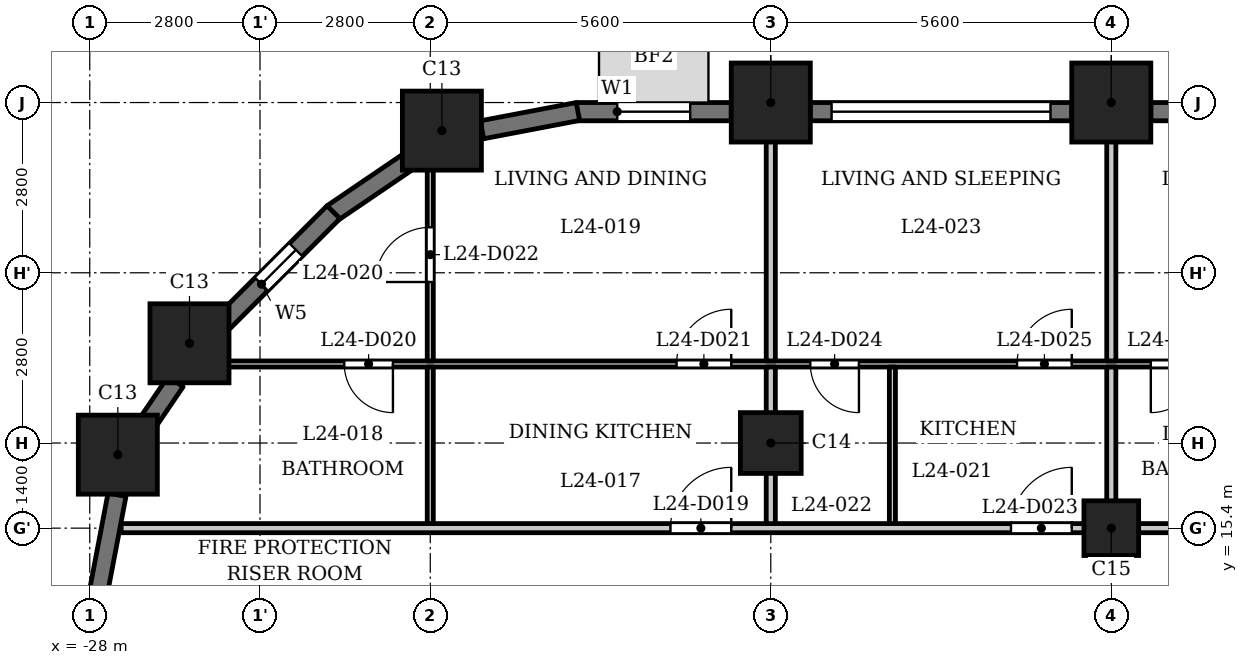
"""IFC4 building model, lengths in metres.
Left out: names, types, materials, properties, quantities, classifications, styles, units other than length and angle.
Written with IfcOpenShell. Run it as: python <this file> out.ifc"""

import sys

from ifc_helpers import new_model, si_unit, direction, frame, frame_2d, origin, origin_2d, place, context, subcontext, project, spatial, rectangle, extrude, element, fill, save


model = new_model("IFC4")
c1 = context("Model", 3, precision=1e-05, world=origin(), true_north=direction((0.0, 1.0)))
c2 = subcontext(c1, "Body", "Model", "MODEL_VIEW")
j1 = project(units=[si_unit("LENGTHUNIT", "METRE"), si_unit("PLANEANGLEUNIT", "RADIAN")], contexts=[c1])
p1 = place(None, origin())
s1 = spatial("IfcSite", under=j1, at=p1, CompositionType="ELEMENT")
p2 = place(p1, origin())
s2 = spatial("IfcBuilding", under=s1, at=p2, CompositionType="ELEMENT")
p3 = place(p2, frame((0.0, 0.0, 97.3)))
s3 = spatial("IfcBuildingStorey", under=s2, at=p3, CompositionType="ELEMENT", Elevation=97.3)
for number, where, z_axis, x_axis in (
    (1, (-11.2, 22.4, 0.0), (0.0, 0.0, 1.0), (1.0, 0.0, 0.0)),
    (2, (-16.8, 22.4, 0.0), (0.0, 0.0, 1.0), (1.0, 0.0, 0.0)),
    (3, (-22.209, 21.938, 0.0), (0.0, 0.0, 1.0), (1.0, 0.0, 0.0)),
    (4, (-26.36, 18.44, 0.0), (0.0, 0.0, 1.0), (1.0, 0.0, 0.0)),
    (5, (-27.538, 16.609, 0.0), (0.0, 0.0, 1.0), (1.0, 0.0, 0.0)),
):
    element("IfcColumn", number, at=place(p3, frame(where, z_axis=z_axis, x_axis=x_axis)), inside=s3, PredefinedType="COLUMN", context=c2, shape_type="SweptSolid", body=[
        extrude(rectangle(XDim=1.3, YDim=1.3, at=origin_2d()), origin(), (0.0, 0.0, 1.0), 3.5),
    ])
p4 = place(p3, frame((-16.8, 16.8, 0.0), z_axis=(0.0, 0.0, 1.0), x_axis=(1.0, 0.0, 0.0)))
e6 = element("IfcColumn", 6, at=p4, inside=s3, PredefinedType="COLUMN", context=c2, shape_type="SweptSolid", body=[
    extrude(rectangle(XDim=1.0, YDim=1.0, at=origin_2d()), origin(), (0.0, 0.0, 1.0), 3.5),
])
p5 = place(p3, frame((-11.2, 15.4, 0.0), z_axis=(0.0, 0.0, 1.0), x_axis=(1.0, 0.0, 0.0)))
e7 = element("IfcColumn", 7, at=p5, inside=s3, PredefinedType="COLUMN", context=c2, shape_type="SweptSolid", body=[
    extrude(rectangle(XDim=0.9, YDim=0.9, at=origin_2d()), origin(), (0.0, 0.0, 1.0), 3.5),
])
p6 = place(p3, frame((-6.25, 22.25, 0.0), z_axis=(0.0, 0.0, 1.0), x_axis=(-1.0, 0.0, 0.0)))
e8 = element("IfcWall", 8, at=p6, inside=s3, PredefinedType="SOLIDWALL", context=c2, shape_type="SweptSolid", body=[
    extrude(rectangle(XDim=4.3, YDim=0.3, at=frame_2d((2.15, 0.0))), origin(), (0.0, 0.0, 1.0), 2.4),
])
p7 = place(p6, frame((0.35, 0.0, 1.2)))
e9 = element("IfcOpeningElement", 9, at=p7, cuts=e8, PredefinedType="OPENING", context=c2, shape_type="SweptSolid", body=[
    extrude(rectangle(XDim=3.6, YDim=0.95, at=frame_2d((1.8, 0.475))), frame((0.0, 0.16, 0.0), z_axis=(0.0, -1.0, 0.0), x_axis=(1.0, 0.0, 0.0)), (0.0, 0.0, 1.0), 0.32),
])
p8 = place(p3, frame((-11.85, 22.25, 0.0), z_axis=(0.0, 0.0, 1.0), x_axis=(-1.0, 0.0, 0.0)))
e10 = element("IfcWall", 10, at=p8, inside=s3, PredefinedType="SOLIDWALL", context=c2, shape_type="SweptSolid", body=[
    extrude(rectangle(XDim=4.3, YDim=0.3, at=frame_2d((2.15, 0.0))), origin(), (0.0, 0.0, 1.0), 2.4),
])
p9 = place(p8, frame((0.35, 0.0, 1.2)))
e11 = element("IfcOpeningElement", 11, at=p9, cuts=e10, PredefinedType="OPENING", context=c2, shape_type="SweptSolid", body=[
    extrude(rectangle(XDim=3.6, YDim=0.95, at=frame_2d((1.8, 0.475))), frame((0.0, 0.16, 0.0), z_axis=(0.0, -1.0, 0.0), x_axis=(1.0, 0.0, 0.0)), (0.0, 0.0, 1.0), 0.32),
])
p10 = place(p3, frame((-17.45, 22.25, 0.0), z_axis=(0.0, 0.0, 1.0), x_axis=(-1.0, 0.0, 0.0)))
e12 = element("IfcWall", 12, at=p10, inside=s3, PredefinedType="SOLIDWALL", context=c2, shape_type="SweptSolid", body=[
    extrude(rectangle(XDim=2.55, YDim=0.3, at=frame_2d((1.275, 0.0))), origin(), (0.0, 0.0, 1.0), 2.4),
])
p11 = place(p10, frame((0.675, 0.0, 0.6)))
e13 = element("IfcOpeningElement", 13, at=p11, cuts=e12, PredefinedType="OPENING", context=c2, shape_type="SweptSolid", body=[
    extrude(rectangle(XDim=1.2, YDim=1.55, at=frame_2d((0.6, 0.775))), frame((0.0, 0.16, 0.0), z_axis=(0.0, -1.0, 0.0), x_axis=(1.0, 0.0, 0.0)), (0.0, 0.0, 1.0), 0.32),
])
for number, where, z_axis, x_axis in (
    (14, (-19.972, 22.253, 0.0), (0.0, 0.0, 1.0), (-0.982, -0.187, 0.0)),
    (15, (-22.684, 21.482, 0.0), (0.0, 0.0, 1.0), (-0.827, -0.562, 0.0)),
):
    element("IfcWall", number, at=place(p3, frame(where, z_axis=z_axis, x_axis=x_axis)), inside=s3, PredefinedType="SOLIDWALL", context=c2, shape_type="SweptSolid", body=[
        extrude(rectangle(XDim=1.606, YDim=0.3, at=frame_2d((0.803, 0.0))), origin(), (0.0, 0.0, 1.0), 2.4),
    ])
p12 = place(p3, frame((-23.991, 20.597, 0.0), z_axis=(0.0, 0.0, 1.0), x_axis=(-0.707106781187, -0.707106781187, 0.0)))
e16 = element("IfcWall", 16, at=p12, inside=s3, PredefinedType="SOLIDWALL", context=c2, shape_type="SweptSolid", body=[
    extrude(rectangle(XDim=2.55, YDim=0.3, at=frame_2d((1.275, 0.0))), origin(), (0.0, 0.0, 1.0), 2.4),
])
p13 = place(p12, frame((0.875, 0.0, 0.6)))
e17 = element("IfcOpeningElement", 17, at=p13, cuts=e16, PredefinedType="OPENING", context=c2, shape_type="SweptSolid", body=[
    extrude(rectangle(XDim=0.8, YDim=1.55, at=frame_2d((0.4, 0.775))), frame((0.0, 0.16, 0.0), z_axis=(0.0, -1.0, 0.0), x_axis=(1.0, 0.0, 0.0)), (0.0, 0.0, 1.0), 0.32),
])
p14 = place(p3, frame((-26.589, 17.81, 0.0), z_axis=(0.0, 0.0, 1.0), x_axis=(-0.562066330934, -0.827092159091, 0.0)))
e18 = element("IfcWall", 18, at=p14, inside=s3, PredefinedType="SOLIDWALL", context=c2, shape_type="SweptSolid", body=[
    extrude(rectangle(XDim=0.877, YDim=0.3, at=frame_2d((0.438, 0.0))), origin(), (0.0, 0.0, 1.0), 3.2),
])
p15 = place(p3, frame((-27.552, 15.949, 0.0), z_axis=(0.0, 0.0, 1.0), x_axis=(-0.187279751651, -0.982306619453, 0.0)))
e19 = element("IfcWall", 19, at=p15, inside=s3, PredefinedType="SOLIDWALL", context=c2, shape_type="SweptSolid", body=[
    extrude(rectangle(XDim=1.606, YDim=0.3, at=frame_2d((0.803, 0.0))), origin(), (0.0, 0.0, 1.0), 2.4),
])
p16 = place(p3, frame((-27.484, 15.4, 0.0), z_axis=(0.0, 0.0, 1.0), x_axis=(1.0, 0.0, 0.0)))
e20 = element("IfcWall", 20, at=p16, inside=s3, PredefinedType="PARTITIONING", context=c2, shape_type="SweptSolid", body=[
    extrude(rectangle(XDim=54.968, YDim=0.15, at=frame_2d((27.484, 0.0))), origin(), (0.0, 0.0, 1.0), 3.2),
])
p17 = place(p16, frame((9.034, 0.0, 0.0)))
e21 = element("IfcOpeningElement", 21, at=p17, cuts=e20, PredefinedType="OPENING", context=c2, shape_type="SweptSolid", body=[
    extrude(rectangle(XDim=1.0, YDim=2.1, at=frame_2d((0.5, 1.05))), frame((0.0, 0.085, 0.0), z_axis=(0.0, -1.0, 0.0), x_axis=(1.0, 0.0, 0.0)), (0.0, 0.0, 1.0), 0.17),
])
p18 = place(p16, frame((14.634, 0.0, 0.0)))
e22 = element("IfcOpeningElement", 22, at=p18, cuts=e20, PredefinedType="OPENING", context=c2, shape_type="SweptSolid", body=[
    extrude(rectangle(XDim=1.0, YDim=2.1, at=frame_2d((0.5, 1.05))), frame((0.0, 0.085, 0.0), z_axis=(0.0, -1.0, 0.0), x_axis=(1.0, 0.0, 0.0)), (0.0, 0.0, 1.0), 0.17),
])
p19 = place(p16, frame((19.984, 0.0, 0.0)))
e23 = element("IfcOpeningElement", 23, at=p19, cuts=e20, PredefinedType="OPENING", context=c2, shape_type="SweptSolid", body=[
    extrude(rectangle(XDim=1.0, YDim=2.1, at=frame_2d((0.5, 1.05))), frame((0.0, 0.085, 0.0), z_axis=(0.0, -1.0, 0.0), x_axis=(1.0, 0.0, 0.0)), (0.0, 0.0, 1.0), 0.17),
])
p20 = place(p16, frame((23.234, 0.0, 0.0)))
e24 = element("IfcOpeningElement", 24, at=p20, cuts=e20, PredefinedType="OPENING", context=c2, shape_type="SweptSolid", body=[
    extrude(rectangle(XDim=1.0, YDim=2.1, at=frame_2d((0.5, 1.05))), frame((0.0, 0.085, 0.0), z_axis=(0.0, -1.0, 0.0), x_axis=(1.0, 0.0, 0.0)), (0.0, 0.0, 1.0), 0.17),
])
p21 = place(p16, frame((28.184, 0.0, 0.0)))
e25 = element("IfcOpeningElement", 25, at=p21, cuts=e20, PredefinedType="OPENING", context=c2, shape_type="SweptSolid", body=[
    extrude(rectangle(XDim=1.0, YDim=2.1, at=frame_2d((0.5, 1.05))), frame((0.0, 0.085, 0.0), z_axis=(0.0, -1.0, 0.0), x_axis=(1.0, 0.0, 0.0)), (0.0, 0.0, 1.0), 0.17),
])
p22 = place(p16, frame((39.284, 0.0, 0.0)))
e26 = element("IfcOpeningElement", 26, at=p22, cuts=e20, PredefinedType="OPENING", context=c2, shape_type="SweptSolid", body=[
    extrude(rectangle(XDim=1.0, YDim=2.1, at=frame_2d((0.5, 1.05))), frame((0.0, 0.085, 0.0), z_axis=(0.0, -1.0, 0.0), x_axis=(1.0, 0.0, 0.0)), (0.0, 0.0, 1.0), 0.17),
])
p23 = place(p16, frame((48.234, 0.0, 0.0)))
e27 = element("IfcOpeningElement", 27, at=p23, cuts=e20, PredefinedType="OPENING", context=c2, shape_type="SweptSolid", body=[
    extrude(rectangle(XDim=1.0, YDim=2.1, at=frame_2d((0.5, 1.05))), frame((0.0, 0.085, 0.0), z_axis=(0.0, -1.0, 0.0), x_axis=(1.0, 0.0, 0.0)), (0.0, 0.0, 1.0), 0.17),
])
p24 = place(p3, frame((-26.44, 18.1, 0.0), z_axis=(0.0, 0.0, 1.0), x_axis=(1.0, 0.0, 0.0)))
e28 = element("IfcWall", 28, at=p24, inside=s3, PredefinedType="PARTITIONING", context=c2, shape_type="SweptSolid", body=[
    extrude(rectangle(XDim=52.63, YDim=0.1, at=frame_2d((26.315, 0.0))), origin(), (0.0, 0.0, 1.0), 3.2),
])
p25 = place(p24, frame((2.626, 0.0, 0.0)))
e29 = element("IfcOpeningElement", 29, at=p25, cuts=e28, PredefinedType="OPENING", context=c2, shape_type="SweptSolid", body=[
    extrude(rectangle(XDim=0.8, YDim=2.1, at=frame_2d((0.4, 1.05))), frame((0.0, 0.06, 0.0), z_axis=(0.0, -1.0, 0.0), x_axis=(1.0, 0.0, 0.0)), (0.0, 0.0, 1.0), 0.12),
])
p26 = place(p24, frame((8.09, 0.0, 0.0)))
e30 = element("IfcOpeningElement", 30, at=p26, cuts=e28, PredefinedType="OPENING", context=c2, shape_type="SweptSolid", body=[
    extrude(rectangle(XDim=0.9, YDim=2.1, at=frame_2d((0.45, 1.05))), frame((0.0, 0.06, 0.0), z_axis=(0.0, -1.0, 0.0), x_axis=(1.0, 0.0, 0.0)), (0.0, 0.0, 1.0), 0.12),
])
p27 = place(p24, frame((10.29, 0.0, 0.0)))
e31 = element("IfcOpeningElement", 31, at=p27, cuts=e28, PredefinedType="OPENING", context=c2, shape_type="SweptSolid", body=[
    extrude(rectangle(XDim=0.8, YDim=2.1, at=frame_2d((0.4, 1.05))), frame((0.0, 0.06, 0.0), z_axis=(0.0, -1.0, 0.0), x_axis=(1.0, 0.0, 0.0)), (0.0, 0.0, 1.0), 0.12),
])
p28 = place(p24, frame((13.69, 0.0, 0.0)))
e32 = element("IfcOpeningElement", 32, at=p28, cuts=e28, PredefinedType="OPENING", context=c2, shape_type="SweptSolid", body=[
    extrude(rectangle(XDim=0.9, YDim=2.1, at=frame_2d((0.45, 1.05))), frame((0.0, 0.06, 0.0), z_axis=(0.0, -1.0, 0.0), x_axis=(1.0, 0.0, 0.0)), (0.0, 0.0, 1.0), 0.12),
])
p29 = place(p24, frame((15.89, 0.0, 0.0)))
e33 = element("IfcOpeningElement", 33, at=p29, cuts=e28, PredefinedType="OPENING", context=c2, shape_type="SweptSolid", body=[
    extrude(rectangle(XDim=0.8, YDim=2.1, at=frame_2d((0.4, 1.05))), frame((0.0, 0.06, 0.0), z_axis=(0.0, -1.0, 0.0), x_axis=(1.0, 0.0, 0.0)), (0.0, 0.0, 1.0), 0.12),
])
p30 = place(p24, frame((19.04, 0.0, 0.0)))
e34 = element("IfcOpeningElement", 34, at=p30, cuts=e28, PredefinedType="OPENING", context=c2, shape_type="SweptSolid", body=[
    extrude(rectangle(XDim=0.9, YDim=2.1, at=frame_2d((0.45, 1.05))), frame((0.0, 0.06, 0.0), z_axis=(0.0, -1.0, 0.0), x_axis=(1.0, 0.0, 0.0)), (0.0, 0.0, 1.0), 0.12),
])
p31 = place(p24, frame((24.99, 0.0, 0.0)))
e35 = element("IfcOpeningElement", 35, at=p31, cuts=e28, PredefinedType="OPENING", context=c2, shape_type="SweptSolid", body=[
    extrude(rectangle(XDim=0.8, YDim=2.1, at=frame_2d((0.4, 1.05))), frame((0.0, 0.06, 0.0), z_axis=(0.0, -1.0, 0.0), x_axis=(1.0, 0.0, 0.0)), (0.0, 0.0, 1.0), 0.12),
])
p32 = place(p24, frame((22.29, 0.0, 0.0)))
e36 = element("IfcOpeningElement", 36, at=p32, cuts=e28, PredefinedType="OPENING", context=c2, shape_type="SweptSolid", body=[
    extrude(rectangle(XDim=0.9, YDim=2.1, at=frame_2d((0.45, 1.05))), frame((0.0, 0.06, 0.0), z_axis=(0.0, -1.0, 0.0), x_axis=(1.0, 0.0, 0.0)), (0.0, 0.0, 1.0), 0.12),
])
p33 = place(p24, frame((32.69, 0.0, 0.0)))
e37 = element("IfcOpeningElement", 37, at=p33, cuts=e28, PredefinedType="OPENING", context=c2, shape_type="SweptSolid", body=[
    extrude(rectangle(XDim=0.8, YDim=2.1, at=frame_2d((0.4, 1.05))), frame((0.0, 0.06, 0.0), z_axis=(0.0, -1.0, 0.0), x_axis=(1.0, 0.0, 0.0)), (0.0, 0.0, 1.0), 0.12),
])
p34 = place(p24, frame((26.99, 0.0, 0.0)))
e38 = element("IfcOpeningElement", 38, at=p34, cuts=e28, PredefinedType="OPENING", context=c2, shape_type="SweptSolid", body=[
    extrude(rectangle(XDim=0.9, YDim=2.1, at=frame_2d((0.45, 1.05))), frame((0.0, 0.06, 0.0), z_axis=(0.0, -1.0, 0.0), x_axis=(1.0, 0.0, 0.0)), (0.0, 0.0, 1.0), 0.12),
])
p35 = place(p24, frame((41.29, 0.0, 0.0)))
e39 = element("IfcOpeningElement", 39, at=p35, cuts=e28, PredefinedType="OPENING", context=c2, shape_type="SweptSolid", body=[
    extrude(rectangle(XDim=0.8, YDim=2.1, at=frame_2d((0.4, 1.05))), frame((0.0, 0.06, 0.0), z_axis=(0.0, -1.0, 0.0), x_axis=(1.0, 0.0, 0.0)), (0.0, 0.0, 1.0), 0.12),
])
p36 = place(p24, frame((38.34, 0.0, 0.0)))
e40 = element("IfcOpeningElement", 40, at=p36, cuts=e28, PredefinedType="OPENING", context=c2, shape_type="SweptSolid", body=[
    extrude(rectangle(XDim=0.9, YDim=2.1, at=frame_2d((0.45, 1.05))), frame((0.0, 0.06, 0.0), z_axis=(0.0, -1.0, 0.0), x_axis=(1.0, 0.0, 0.0)), (0.0, 0.0, 1.0), 0.12),
])
p37 = place(p24, frame((50.74, 0.0, 0.0)))
e41 = element("IfcOpeningElement", 41, at=p37, cuts=e28, PredefinedType="OPENING", context=c2, shape_type="SweptSolid", body=[
    extrude(rectangle(XDim=0.8, YDim=2.1, at=frame_2d((0.4, 1.05))), frame((0.0, 0.06, 0.0), z_axis=(0.0, -1.0, 0.0), x_axis=(1.0, 0.0, 0.0)), (0.0, 0.0, 1.0), 0.12),
])
p38 = place(p24, frame((47.29, 0.0, 0.0)))
e42 = element("IfcOpeningElement", 42, at=p38, cuts=e28, PredefinedType="OPENING", context=c2, shape_type="SweptSolid", body=[
    extrude(rectangle(XDim=0.9, YDim=2.1, at=frame_2d((0.45, 1.05))), frame((0.0, 0.06, 0.0), z_axis=(0.0, -1.0, 0.0), x_axis=(1.0, 0.0, 0.0)), (0.0, 0.0, 1.0), 0.12),
])
p39 = place(p3, frame((-22.4, 15.475, 0.0), z_axis=(0.0, 0.0, 1.0), x_axis=(0.0, 1.0, 0.0)))
e43 = element("IfcWall", 43, at=p39, inside=s3, PredefinedType="PARTITIONING", context=c2, shape_type="SweptSolid", body=[
    extrude(rectangle(XDim=2.575, YDim=0.1, at=frame_2d((1.288, 0.0))), origin(), (0.0, 0.0, 1.0), 3.2),
])
p40 = place(p3, frame((-22.4, 18.15, 0.0), z_axis=(0.0, 0.0, 1.0), x_axis=(0.0, 1.0, 0.0)))
e44 = element("IfcWall", 44, at=p40, inside=s3, PredefinedType="PARTITIONING", context=c2, shape_type="SweptSolid", body=[
    extrude(rectangle(XDim=3.57, YDim=0.1, at=frame_2d((1.785, 0.0))), origin(), (0.0, 0.0, 1.0), 3.2),
])
p41 = place(p40, frame((1.298, 0.0, 0.0)))
e45 = element("IfcOpeningElement", 45, at=p41, cuts=e44, PredefinedType="OPENING", context=c2, shape_type="SweptSolid", body=[
    extrude(rectangle(XDim=0.9, YDim=2.1, at=frame_2d((0.45, 1.05))), frame((0.0, 0.06, 0.0), z_axis=(0.0, -1.0, 0.0), x_axis=(1.0, 0.0, 0.0)), (0.0, 0.0, 1.0), 0.12),
])
p42 = place(p3, frame((-16.8, 15.475, 0.0), z_axis=(0.0, 0.0, 1.0), x_axis=(0.0, 1.0, 0.0)))
e46 = element("IfcWall", 46, at=p42, inside=s3, PredefinedType="PARTITIONING", context=c2, shape_type="SweptSolid", body=[
    extrude(rectangle(XDim=2.575, YDim=0.15, at=frame_2d((1.288, 0.0))), origin(), (0.0, 0.0, 1.0), 3.2),
])
p43 = place(p3, frame((-16.8, 18.15, 0.0), z_axis=(0.0, 0.0, 1.0), x_axis=(0.0, 1.0, 0.0)))
e47 = element("IfcWall", 47, at=p43, inside=s3, PredefinedType="PARTITIONING", context=c2, shape_type="SweptSolid", body=[
    extrude(rectangle(XDim=4.88, YDim=0.15, at=frame_2d((2.44, 0.0))), origin(), (0.0, 0.0, 1.0), 3.2),
])
p44 = place(p3, frame((-14.8, 15.475, 0.0), z_axis=(0.0, 0.0, 1.0), x_axis=(0.0, 1.0, 0.0)))
e48 = element("IfcWall", 48, at=p44, inside=s3, PredefinedType="PARTITIONING", context=c2, shape_type="SweptSolid", body=[
    extrude(rectangle(XDim=2.575, YDim=0.1, at=frame_2d((1.288, 0.0))), origin(), (0.0, 0.0, 1.0), 3.2),
])
p45 = place(p3, frame((-11.2, 15.475, 0.0), z_axis=(0.0, 0.0, 1.0), x_axis=(0.0, 1.0, 0.0)))
e49 = element("IfcWall", 49, at=p45, inside=s3, PredefinedType="PARTITIONING", context=c2, shape_type="SweptSolid", body=[
    extrude(rectangle(XDim=2.575, YDim=0.15, at=frame_2d((1.288, 0.0))), origin(), (0.0, 0.0, 1.0), 3.2),
])
p46 = place(p3, frame((-11.2, 18.15, 0.0), z_axis=(0.0, 0.0, 1.0), x_axis=(0.0, 1.0, 0.0)))
e50 = element("IfcWall", 50, at=p46, inside=s3, PredefinedType="PARTITIONING", context=c2, shape_type="SweptSolid", body=[
    extrude(rectangle(XDim=4.88, YDim=0.15, at=frame_2d((2.44, 0.0))), origin(), (0.0, 0.0, 1.0), 3.2),
])
p47 = place(p17, origin())
e51 = element("IfcDoor", 51, at=p47, inside=s3, OperationType="SINGLE_SWING_LEFT", PredefinedType="DOOR", context=c2, shape_type="SweptSolid", body=[
    extrude(rectangle(XDim=1.0, YDim=2.1, at=frame_2d((0.5, 1.05))), frame((0.0, 0.025, 0.0), z_axis=(0.0, -1.0, 0.0), x_axis=(1.0, 0.0, 0.0)), (0.0, 0.0, 1.0), 0.05),
])
fill(e21, e51)
p48 = place(p25, origin())
e52 = element("IfcDoor", 52, at=p48, inside=s3, OperationType="SINGLE_SWING_RIGHT", PredefinedType="DOOR", context=c2, shape_type="SweptSolid", body=[
    extrude(rectangle(XDim=0.8, YDim=2.1, at=frame_2d((0.4, 1.05))), frame((0.0, 0.025, 0.0), z_axis=(0.0, -1.0, 0.0), x_axis=(1.0, 0.0, 0.0)), (0.0, 0.0, 1.0), 0.05),
])
fill(e29, e52)
p49 = place(p26, origin())
e53 = element("IfcDoor", 53, at=p49, inside=s3, OperationType="SINGLE_SWING_LEFT", PredefinedType="DOOR", context=c2, shape_type="SweptSolid", body=[
    extrude(rectangle(XDim=0.9, YDim=2.1, at=frame_2d((0.45, 1.05))), frame((0.0, 0.025, 0.0), z_axis=(0.0, -1.0, 0.0), x_axis=(1.0, 0.0, 0.0)), (0.0, 0.0, 1.0), 0.05),
])
fill(e30, e53)
p50 = place(p41, origin())
e54 = element("IfcDoor", 54, at=p50, inside=s3, OperationType="SINGLE_SWING_RIGHT", PredefinedType="DOOR", context=c2, shape_type="SweptSolid", body=[
    extrude(rectangle(XDim=0.9, YDim=2.1, at=frame_2d((0.45, 1.05))), frame((0.0, 0.025, 0.0), z_axis=(0.0, -1.0, 0.0), x_axis=(1.0, 0.0, 0.0)), (0.0, 0.0, 1.0), 0.05),
])
fill(e45, e54)
p51 = place(p18, origin())
e55 = element("IfcDoor", 55, at=p51, inside=s3, OperationType="SINGLE_SWING_LEFT", PredefinedType="DOOR", context=c2, shape_type="SweptSolid", body=[
    extrude(rectangle(XDim=1.0, YDim=2.1, at=frame_2d((0.5, 1.05))), frame((0.0, 0.025, 0.0), z_axis=(0.0, -1.0, 0.0), x_axis=(1.0, 0.0, 0.0)), (0.0, 0.0, 1.0), 0.05),
])
fill(e22, e55)
p52 = place(p27, origin())
e56 = element("IfcDoor", 56, at=p52, inside=s3, OperationType="SINGLE_SWING_RIGHT", PredefinedType="DOOR", context=c2, shape_type="SweptSolid", body=[
    extrude(rectangle(XDim=0.8, YDim=2.1, at=frame_2d((0.4, 1.05))), frame((0.0, 0.025, 0.0), z_axis=(0.0, -1.0, 0.0), x_axis=(1.0, 0.0, 0.0)), (0.0, 0.0, 1.0), 0.05),
])
fill(e31, e56)
p53 = place(p28, origin())
e57 = element("IfcDoor", 57, at=p53, inside=s3, OperationType="SINGLE_SWING_LEFT", PredefinedType="DOOR", context=c2, shape_type="SweptSolid", body=[
    extrude(rectangle(XDim=0.9, YDim=2.1, at=frame_2d((0.45, 1.05))), frame((0.0, 0.025, 0.0), z_axis=(0.0, -1.0, 0.0), x_axis=(1.0, 0.0, 0.0)), (0.0, 0.0, 1.0), 0.05),
])
fill(e32, e57)
p54 = place(p29, origin())
e58 = element("IfcDoor", 58, at=p54, inside=s3, OperationType="SINGLE_SWING_LEFT", PredefinedType="DOOR", context=c2, shape_type="SweptSolid", body=[
    extrude(rectangle(XDim=0.8, YDim=2.1, at=frame_2d((0.4, 1.05))), frame((0.0, 0.025, 0.0), z_axis=(0.0, -1.0, 0.0), x_axis=(1.0, 0.0, 0.0)), (0.0, 0.0, 1.0), 0.05),
])
fill(e33, e58)
p55 = place(p9, origin())
e59 = element("IfcWindow", 59, at=p55, inside=s3, PartitioningType="SINGLE_PANEL", PredefinedType="WINDOW", context=c2, shape_type="SweptSolid", body=[
    extrude(rectangle(XDim=3.6, YDim=0.95, at=frame_2d((1.8, 0.475))), frame((0.0, 0.03, 0.0), z_axis=(0.0, -1.0, 0.0), x_axis=(1.0, 0.0, 0.0)), (0.0, 0.0, 1.0), 0.06),
])
fill(e11, e59)
p56 = place(p11, origin())
e60 = element("IfcWindow", 60, at=p56, inside=s3, PartitioningType="SINGLE_PANEL", PredefinedType="WINDOW", context=c2, shape_type="SweptSolid", body=[
    extrude(rectangle(XDim=1.2, YDim=1.55, at=frame_2d((0.6, 0.775))), frame((0.0, 0.03, 0.0), z_axis=(0.0, -1.0, 0.0), x_axis=(1.0, 0.0, 0.0)), (0.0, 0.0, 1.0), 0.06),
])
fill(e13, e60)
p57 = place(p13, origin())
e61 = element("IfcWindow", 61, at=p57, inside=s3, PartitioningType="SINGLE_PANEL", PredefinedType="WINDOW", context=c2, shape_type="SweptSolid", body=[
    extrude(rectangle(XDim=0.8, YDim=1.55, at=frame_2d((0.4, 0.775))), frame((0.0, 0.03, 0.0), z_axis=(0.0, -1.0, 0.0), x_axis=(1.0, 0.0, 0.0)), (0.0, 0.0, 1.0), 0.06),
])
fill(e17, e61)
save(model, sys.argv[1])
